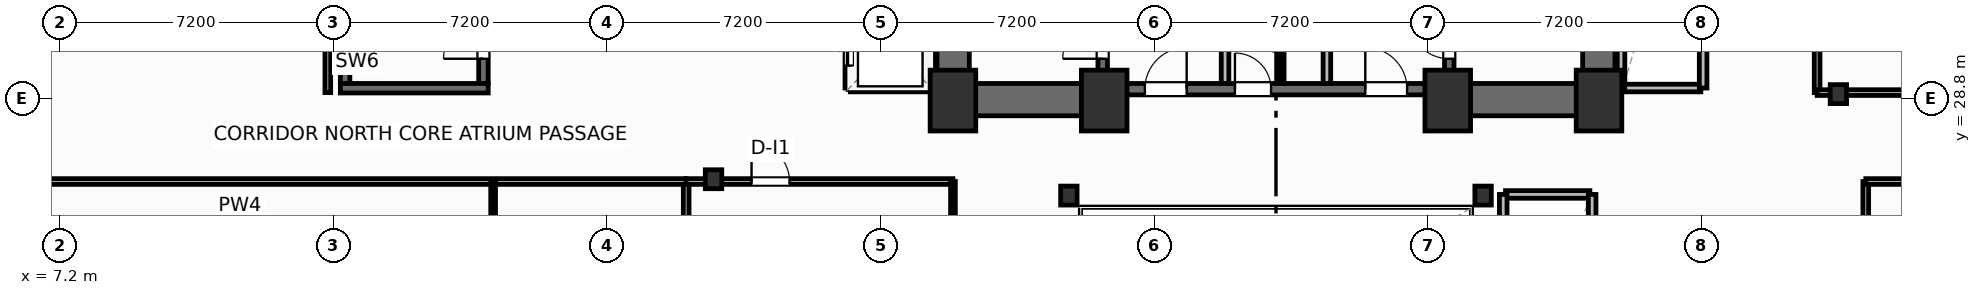
"""IFC4 building model, lengths in metres.
Left out: names, types, materials, properties, quantities, classifications, styles, units other than length and angle.
Written with IfcOpenShell. Run it as: python <this file> out.ifc"""

import sys

from ifc_helpers import new_model, si_unit, direction, frame, frame_2d, origin, origin_2d, place, context, subcontext, project, spatial, rectangle, i_section, extrude, element, fill, save


model = new_model("IFC4")
c1 = context("Model", 3, precision=1e-05, world=origin(), true_north=direction((0.0, 1.0)))
c2 = subcontext(c1, "Body", "Model", "MODEL_VIEW")
j1 = project(units=[si_unit("LENGTHUNIT", "METRE"), si_unit("PLANEANGLEUNIT", "RADIAN")], contexts=[c1])
p1 = place(None, origin())
s1 = spatial("IfcSite", under=j1, at=p1, CompositionType="ELEMENT")
p2 = place(p1, origin())
s2 = spatial("IfcBuilding", under=s1, at=p2, CompositionType="ELEMENT")
p3 = place(p2, frame((0.0, 0.0, 10.8)))
s3 = spatial("IfcBuildingStorey", under=s2, at=p3, CompositionType="ELEMENT", Elevation=10.8)
for number, where, z_axis, x_axis in (
    (1, (30.7, 28.75, 0.0), (0.0, 0.0, 1.0), (1.0, 0.0, 0.0)),
    (2, (34.68, 28.75, 0.0), (0.0, 0.0, 1.0), (1.0, 0.0, 0.0)),
    (3, (43.72, 28.75, 0.0), (0.0, 0.0, 1.0), (1.0, 0.0, 0.0)),
    (4, (47.7, 28.75, 0.0), (0.0, 0.0, 1.0), (1.0, 0.0, 0.0)),
):
    element("IfcColumn", number, at=place(p3, frame(where, z_axis=z_axis, x_axis=x_axis)), inside=s3, PredefinedType="COLUMN", context=c2, shape_type="SweptSolid", body=[
        extrude(rectangle(XDim=1.2, YDim=1.6, at=origin_2d()), origin(), (0.0, 0.0, 1.0), 5.4),
    ])
for number, where, z_axis, x_axis in (
    (5, (33.75, 26.25, 0.0), (0.0, 0.0, 1.0), (1.0, 0.0, 0.0)),
    (6, (44.65, 26.25, 0.0), (0.0, 0.0, 1.0), (1.0, 0.0, 0.0)),
    (7, (24.4, 26.68, 0.0), (0.0, 0.0, 1.0), (1.0, 0.0, 0.0)),
    (8, (54.0, 28.92, 0.0), (0.0, 0.0, 1.0), (1.0, 0.0, 0.0)),
):
    element("IfcColumn", number, at=place(p3, frame(where, z_axis=z_axis, x_axis=x_axis)), inside=s3, PredefinedType="COLUMN", context=c2, shape_type="SweptSolid", body=[
        extrude(i_section(OverallWidth=0.432, OverallDepth=0.498, WebThickness=0.056, FlangeThickness=0.089, FilletRadius=0.025, at=origin_2d()), origin(), (0.0, 0.0, 1.0), 5.4),
    ])
for number, where, z_axis, x_axis in (
    (9, (30.705, 29.2, 0.0), (0.0, 0.0, 1.0), (0.0, 1.0, 0.0)),
    (10, (47.695, 29.2, 0.0), (0.0, 0.0, 1.0), (0.0, 1.0, 0.0)),
):
    element("IfcWall", number, at=place(p3, frame(where, z_axis=z_axis, x_axis=x_axis)), inside=s3, PredefinedType="SHEAR", context=c2, shape_type="SweptSolid", body=[
        extrude(rectangle(XDim=9.22, YDim=0.85, at=frame_2d((4.61, 0.0))), origin(), (0.0, 0.0, 1.0), 5.12),
    ])
for number, where, z_axis, x_axis in (
    (11, (30.28, 28.775, 0.0), (0.0, 0.0, 1.0), (1.0, 0.0, 0.0)),
    (12, (43.6, 28.775, 0.0), (0.0, 0.0, 1.0), (1.0, 0.0, 0.0)),
):
    element("IfcWall", number, at=place(p3, frame(where, z_axis=z_axis, x_axis=x_axis)), inside=s3, PredefinedType="SHEAR", context=c2, shape_type="SweptSolid", body=[
        extrude(rectangle(XDim=4.52, YDim=0.85, at=frame_2d((2.26, 0.0))), origin(), (0.0, 0.0, 1.0), 5.12),
    ])
p4 = place(p3, frame((34.8, 29.05, 0.0), z_axis=(0.0, 0.0, 1.0), x_axis=(1.0, 0.0, 0.0)))
e13 = element("IfcWall", 13, at=p4, inside=s3, PredefinedType="SHEAR", context=c2, shape_type="SweptSolid", body=[
    extrude(rectangle(XDim=8.8, YDim=0.3, at=frame_2d((4.4, 0.0))), origin(), (0.0, 0.0, 1.0), 5.12),
])
p5 = place(p4, frame((0.95, 0.0, 0.0)))
e14 = element("IfcOpeningElement", 14, at=p5, cuts=e13, PredefinedType="OPENING", context=c2, shape_type="SweptSolid", body=[
    extrude(rectangle(XDim=1.1, YDim=2.15, at=frame_2d((0.55, 1.075))), frame((0.0, 0.16, 0.0), z_axis=(0.0, -1.0, 0.0), x_axis=(1.0, 0.0, 0.0)), (0.0, 0.0, 1.0), 0.32),
])
p6 = place(p4, frame((6.75, 0.0, 0.0)))
e15 = element("IfcOpeningElement", 15, at=p6, cuts=e13, PredefinedType="OPENING", context=c2, shape_type="SweptSolid", body=[
    extrude(rectangle(XDim=1.1, YDim=2.15, at=frame_2d((0.55, 1.075))), frame((0.0, 0.16, 0.0), z_axis=(0.0, -1.0, 0.0), x_axis=(1.0, 0.0, 0.0)), (0.0, 0.0, 1.0), 0.32),
])
p7 = place(p4, frame((3.32, 0.0, 0.0)))
e16 = element("IfcOpeningElement", 16, at=p7, cuts=e13, PredefinedType="OPENING", context=c2, shape_type="SweptSolid", body=[
    extrude(rectangle(XDim=0.95, YDim=2.15, at=frame_2d((0.475, 1.075))), frame((0.0, 0.16, 0.0), z_axis=(0.0, -1.0, 0.0), x_axis=(1.0, 0.0, 0.0)), (0.0, 0.0, 1.0), 0.32),
])
p8 = place(p3, frame((34.64, 29.2, 0.0), z_axis=(0.0, 0.0, 1.0), x_axis=(0.0, 1.0, 0.0)))
e17 = element("IfcWall", 17, at=p8, inside=s3, PredefinedType="SHEAR", context=c2, shape_type="SweptSolid", body=[
    extrude(rectangle(XDim=9.22, YDim=0.25, at=frame_2d((4.61, 0.0))), origin(), (0.0, 0.0, 1.0), 5.12),
])
p9 = place(p8, frame((0.65, 0.0, 0.0)))
e18 = element("IfcOpeningElement", 18, at=p9, cuts=e17, PredefinedType="OPENING", context=c2, shape_type="SweptSolid", body=[
    extrude(rectangle(XDim=1.05, YDim=2.15, at=frame_2d((0.525, 1.075))), frame((0.0, 0.135, 0.0), z_axis=(0.0, -1.0, 0.0), x_axis=(1.0, 0.0, 0.0)), (0.0, 0.0, 1.0), 0.27),
])
p10 = place(p3, frame((43.76, 29.2, 0.0), z_axis=(0.0, 0.0, 1.0), x_axis=(0.0, 1.0, 0.0)))
e19 = element("IfcWall", 19, at=p10, inside=s3, PredefinedType="SHEAR", context=c2, shape_type="SweptSolid", body=[
    extrude(rectangle(XDim=9.22, YDim=0.25, at=frame_2d((4.61, 0.0))), origin(), (0.0, 0.0, 1.0), 5.12),
])
p11 = place(p10, frame((0.65, 0.0, 0.0)))
e20 = element("IfcOpeningElement", 20, at=p11, cuts=e19, PredefinedType="OPENING", context=c2, shape_type="SweptSolid", body=[
    extrude(rectangle(XDim=1.05, YDim=2.15, at=frame_2d((0.525, 1.075))), frame((0.0, 0.135, 0.0), z_axis=(0.0, -1.0, 0.0), x_axis=(1.0, 0.0, 0.0)), (0.0, 0.0, 1.0), 0.27),
])
p12 = place(p3, frame((14.705, 29.2, 0.0), z_axis=(0.0, 0.0, 1.0), x_axis=(0.0, 1.0, 0.0)))
e21 = element("IfcWall", 21, at=p12, inside=s3, PredefinedType="SHEAR", context=c2, shape_type="SweptSolid", body=[
    extrude(rectangle(XDim=9.22, YDim=0.25, at=frame_2d((4.61, 0.0))), origin(), (0.0, 0.0, 1.0), 5.12),
])
p13 = place(p3, frame((18.345, 29.2, 0.0), z_axis=(0.0, 0.0, 1.0), x_axis=(0.0, 1.0, 0.0)))
e22 = element("IfcWall", 22, at=p13, inside=s3, PredefinedType="SHEAR", context=c2, shape_type="SweptSolid", body=[
    extrude(rectangle(XDim=9.22, YDim=0.25, at=frame_2d((4.61, 0.0))), origin(), (0.0, 0.0, 1.0), 5.12),
])
p14 = place(p13, frame((0.65, 0.0, 0.0)))
e23 = element("IfcOpeningElement", 23, at=p14, cuts=e22, PredefinedType="OPENING", context=c2, shape_type="SweptSolid", body=[
    extrude(rectangle(XDim=1.05, YDim=2.15, at=frame_2d((0.525, 1.075))), frame((0.0, 0.135, 0.0), z_axis=(0.0, -1.0, 0.0), x_axis=(1.0, 0.0, 0.0)), (0.0, 0.0, 1.0), 0.27),
])
p15 = place(p3, frame((14.58, 29.075, 0.0), z_axis=(0.0, 0.0, 1.0), x_axis=(1.0, 0.0, 0.0)))
e24 = element("IfcWall", 24, at=p15, inside=s3, PredefinedType="SHEAR", context=c2, shape_type="SweptSolid", body=[
    extrude(rectangle(XDim=3.89, YDim=0.25, at=frame_2d((1.945, 0.0))), origin(), (0.0, 0.0, 1.0), 5.12),
])
p16 = place(p3, frame((23.68, 0.25, 0.0), z_axis=(0.0, 0.0, 1.0), x_axis=(0.0, 1.0, 0.0)))
e25 = element("IfcWall", 25, at=p16, inside=s3, PredefinedType="PARTITIONING", context=c2, shape_type="SweptSolid", body=[
    extrude(rectangle(XDim=26.37, YDim=0.15, at=frame_2d((13.185, 0.0))), origin(), (0.0, 0.0, 1.0), 5.12),
])
p17 = place(p16, frame((14.514, 0.0, 0.0)))
e26 = element("IfcOpeningElement", 26, at=p17, cuts=e25, PredefinedType="OPENING", context=c2, shape_type="SweptSolid", body=[
    extrude(rectangle(XDim=2.0, YDim=2.05, at=frame_2d((1.0, 1.025))), frame((0.0, 0.085, 0.0), z_axis=(0.0, -1.0, 0.0), x_axis=(1.0, 0.0, 0.0)), (0.0, 0.0, 1.0), 0.17),
])
p18 = place(p3, frame((54.72, 0.25, 0.0), z_axis=(0.0, 0.0, 1.0), x_axis=(0.0, 1.0, 0.0)))
e27 = element("IfcWall", 27, at=p18, inside=s3, PredefinedType="PARTITIONING", context=c2, shape_type="SweptSolid", body=[
    extrude(rectangle(XDim=26.37, YDim=0.15, at=frame_2d((13.185, 0.0))), origin(), (0.0, 0.0, 1.0), 5.12),
])
p19 = place(p18, frame((14.514, 0.0, 0.0)))
e28 = element("IfcOpeningElement", 28, at=p19, cuts=e27, PredefinedType="OPENING", context=c2, shape_type="SweptSolid", body=[
    extrude(rectangle(XDim=2.0, YDim=2.05, at=frame_2d((1.0, 1.025))), frame((0.0, 0.085, 0.0), z_axis=(0.0, -1.0, 0.0), x_axis=(1.0, 0.0, 0.0)), (0.0, 0.0, 1.0), 0.17),
])
for number, where, z_axis, x_axis in (
    (29, (0.2, 26.62, 0.0), (0.0, 0.0, 1.0), (1.0, 0.0, 0.0)),
    (30, (54.72, 26.62, 0.0), (0.0, 0.0, 1.0), (1.0, 0.0, 0.0)),
):
    element("IfcWall", number, at=place(p3, frame(where, z_axis=z_axis, x_axis=x_axis)), inside=s3, PredefinedType="PARTITIONING", context=c2, shape_type="SweptSolid", body=[
        extrude(rectangle(XDim=23.48, YDim=0.15, at=frame_2d((11.74, 0.0))), origin(), (0.0, 0.0, 1.0), 5.12),
    ])
p20 = place(p3, frame((53.44, 28.96, 0.0), z_axis=(0.0, 0.0, 1.0), x_axis=(0.0, 1.0, 0.0)))
e31 = element("IfcWall", 31, at=p20, inside=s3, PredefinedType="PARTITIONING", context=c2, shape_type="SweptSolid", body=[
    extrude(rectangle(XDim=21.34, YDim=0.15, at=frame_2d((10.67, 0.0))), origin(), (0.0, 0.0, 1.0), 5.12),
])
p21 = place(p20, frame((5.0, 0.0, 0.0)))
e32 = element("IfcOpeningElement", 32, at=p21, cuts=e31, PredefinedType="OPENING", context=c2, shape_type="SweptSolid", body=[
    extrude(rectangle(XDim=1.6, YDim=2.05, at=frame_2d((0.8, 1.025))), frame((0.0, 0.085, 0.0), z_axis=(0.0, -1.0, 0.0), x_axis=(1.0, 0.0, 0.0)), (0.0, 0.0, 1.0), 0.17),
])
p22 = place(p3, frame((53.44, 28.96, 0.0), z_axis=(0.0, 0.0, 1.0), x_axis=(1.0, 0.0, 0.0)))
e33 = element("IfcWall", 33, at=p22, inside=s3, PredefinedType="PARTITIONING", context=c2, shape_type="SweptSolid", body=[
    extrude(rectangle(XDim=24.76, YDim=0.15, at=frame_2d((12.38, 0.0))), origin(), (0.0, 0.0, 1.0), 4.332),
])
p23 = place(p3, frame((14.25, 28.96, 0.0), z_axis=(0.0, 0.0, 1.0), x_axis=(0.0, 1.0, 0.0)))
e34 = element("IfcWall", 34, at=p23, inside=s3, PredefinedType="PARTITIONING", context=c2, shape_type="SweptSolid", body=[
    extrude(rectangle(XDim=21.34, YDim=0.15, at=frame_2d((10.67, 0.0))), origin(), (0.0, 0.0, 1.0), 5.12),
])
p24 = place(p23, frame((10.62, 0.0, 0.0)))
e35 = element("IfcOpeningElement", 35, at=p24, cuts=e34, PredefinedType="OPENING", context=c2, shape_type="SweptSolid", body=[
    extrude(rectangle(XDim=1.0, YDim=2.05, at=frame_2d((0.5, 1.025))), frame((0.0, 0.085, 0.0), z_axis=(0.0, -1.0, 0.0), x_axis=(1.0, 0.0, 0.0)), (0.0, 0.0, 1.0), 0.17),
])
p25 = place(p3, frame((23.68, 26.62, 0.0), z_axis=(0.0, 0.0, 1.0), x_axis=(1.0, 0.0, 0.0)))
e36 = element("IfcWall", 36, at=p25, inside=s3, PredefinedType="PARTITIONING", context=c2, shape_type="SweptSolid", body=[
    extrude(rectangle(XDim=7.02, YDim=0.15, at=frame_2d((3.51, 0.0))), origin(), (0.0, 0.0, 1.0), 4.332),
])
p26 = place(p25, frame((1.72, 0.0, 0.0)))
e37 = element("IfcOpeningElement", 37, at=p26, cuts=e36, PredefinedType="OPENING", context=c2, shape_type="SweptSolid", body=[
    extrude(rectangle(XDim=1.0, YDim=2.05, at=frame_2d((0.5, 1.025))), frame((0.0, 0.085, 0.0), z_axis=(0.0, -1.0, 0.0), x_axis=(1.0, 0.0, 0.0)), (0.0, 0.0, 1.0), 0.17),
])
p27 = place(p3, frame((30.7, 19.24, 0.0), z_axis=(0.0, 0.0, 1.0), x_axis=(0.0, 1.0, 0.0)))
e38 = element("IfcWall", 38, at=p27, inside=s3, PredefinedType="PARTITIONING", context=c2, shape_type="SweptSolid", body=[
    extrude(rectangle(XDim=7.38, YDim=0.125, at=frame_2d((3.69, 0.0))), origin(), (0.0, 0.0, 1.0), 5.12),
])
p28 = place(p3, frame((18.6, 19.24, 0.0), z_axis=(0.0, 0.0, 1.0), x_axis=(0.0, 1.0, 0.0)))
e39 = element("IfcWall", 39, at=p28, inside=s3, PredefinedType="PARTITIONING", context=c2, shape_type="SweptSolid", body=[
    extrude(rectangle(XDim=7.34, YDim=0.125, at=frame_2d((3.67, 0.0))), origin(), (0.0, 0.0, 1.0), 5.12),
])
for number, where, z_axis, x_axis in (
    (40, (37.86, 29.2, 0.0), (0.0, 0.0, 1.0), (0.0, 1.0, 0.0)),
    (41, (40.54, 29.2, 0.0), (0.0, 0.0, 1.0), (0.0, 1.0, 0.0)),
):
    element("IfcWall", number, at=place(p3, frame(where, z_axis=z_axis, x_axis=x_axis)), inside=s3, PredefinedType="PARTITIONING", context=c2, shape_type="SweptSolid", body=[
        extrude(rectangle(XDim=5.18, YDim=0.2, at=frame_2d((2.59, 0.0))), origin(), (0.0, 0.0, 1.0), 5.12),
    ])
p29 = place(p3, frame((39.35, 29.2, 0.0), z_axis=(0.0, 0.0, 1.0), x_axis=(0.0, 1.0, 0.0)))
e42 = element("IfcWall", 42, at=p29, inside=s3, PredefinedType="PARTITIONING", context=c2, shape_type="SweptSolid", body=[
    extrude(rectangle(XDim=5.22, YDim=0.125, at=frame_2d((2.61, 0.0))), origin(), (0.0, 0.0, 1.0), 5.12),
])
p30 = place(p29, frame((0.8, 0.0, 0.0)))
e43 = element("IfcOpeningElement", 43, at=p30, cuts=e42, PredefinedType="OPENING", context=c2, shape_type="SweptSolid", body=[
    extrude(rectangle(XDim=0.85, YDim=2.05, at=frame_2d((0.425, 1.025))), frame((0.0, 0.073, 0.0), z_axis=(0.0, -1.0, 0.0), x_axis=(1.0, 0.0, 0.0)), (0.0, 0.0, 1.0), 0.145),
])
p31 = place(p29, frame((3.4, 0.0, 0.0)))
e44 = element("IfcOpeningElement", 44, at=p31, cuts=e42, PredefinedType="OPENING", context=c2, shape_type="SweptSolid", body=[
    extrude(rectangle(XDim=0.85, YDim=2.05, at=frame_2d((0.425, 1.025))), frame((0.0, 0.073, 0.0), z_axis=(0.0, -1.0, 0.0), x_axis=(1.0, 0.0, 0.0)), (0.0, 0.0, 1.0), 0.145),
])
p32 = place(p3, frame((28.0, 29.08, 0.0), z_axis=(0.0, 0.0, 1.0), x_axis=(1.0, 0.0, 0.0)))
e45 = element("IfcWall", 45, at=p32, inside=s3, PredefinedType="PARTITIONING", context=c2, shape_type="SweptSolid", body=[
    extrude(rectangle(XDim=2.1, YDim=0.2, at=frame_2d((1.05, 0.0))), origin(), (0.0, 0.0, 1.0), 5.12),
])
p33 = place(p3, frame((30.12, 29.08, 0.0), z_axis=(0.0, 0.0, 1.0), x_axis=(0.0, 1.0, 0.0)))
e46 = element("IfcWall", 46, at=p33, inside=s3, PredefinedType="PARTITIONING", context=c2, shape_type="SweptSolid", body=[
    extrude(rectangle(XDim=6.89, YDim=0.2, at=frame_2d((3.445, 0.0))), origin(), (0.0, 0.0, 1.0), 5.12),
])
p34 = place(p3, frame((27.96, 29.08, 0.0), z_axis=(0.0, 0.0, 1.0), x_axis=(0.0, 1.0, 0.0)))
e47 = element("IfcWall", 47, at=p34, inside=s3, PredefinedType="PARTITIONING", context=c2, shape_type="SweptSolid", body=[
    extrude(rectangle(XDim=6.89, YDim=0.2, at=frame_2d((3.445, 0.0))), origin(), (0.0, 0.0, 1.0), 5.12),
])
p35 = place(p34, frame((0.59, 0.0, 0.0)))
e48 = element("IfcOpeningElement", 48, at=p35, cuts=e47, PredefinedType="OPENING", context=c2, shape_type="SweptSolid", body=[
    extrude(rectangle(XDim=1.1, YDim=2.15, at=frame_2d((0.55, 1.075))), frame((0.0, 0.11, 0.0), z_axis=(0.0, -1.0, 0.0), x_axis=(1.0, 0.0, 0.0)), (0.0, 0.0, 1.0), 0.22),
])
p36 = place(p34, frame((2.89, 0.0, 0.0)))
e49 = element("IfcOpeningElement", 49, at=p36, cuts=e47, PredefinedType="OPENING", context=c2, shape_type="SweptSolid", body=[
    extrude(rectangle(XDim=1.1, YDim=2.15, at=frame_2d((0.55, 1.075))), frame((0.0, 0.11, 0.0), z_axis=(0.0, -1.0, 0.0), x_axis=(1.0, 0.0, 0.0)), (0.0, 0.0, 1.0), 0.22),
])
p37 = place(p34, frame((5.19, 0.0, 0.0)))
e50 = element("IfcOpeningElement", 50, at=p37, cuts=e47, PredefinedType="OPENING", context=c2, shape_type="SweptSolid", body=[
    extrude(rectangle(XDim=1.1, YDim=2.15, at=frame_2d((0.55, 1.075))), frame((0.0, 0.11, 0.0), z_axis=(0.0, -1.0, 0.0), x_axis=(1.0, 0.0, 0.0)), (0.0, 0.0, 1.0), 0.22),
])
p38 = place(p3, frame((48.32, 29.08, 0.0), z_axis=(0.0, 0.0, 1.0), x_axis=(1.0, 0.0, 0.0)))
e51 = element("IfcWall", 51, at=p38, inside=s3, PredefinedType="PARTITIONING", context=c2, shape_type="SweptSolid", body=[
    extrude(rectangle(XDim=2.06, YDim=0.2, at=frame_2d((1.03, 0.0))), origin(), (0.0, 0.0, 1.0), 4.332),
])
for number, where, z_axis, x_axis in (
    (52, (48.28, 29.08, 0.0), (0.0, 0.0, 1.0), (0.0, 1.0, 0.0)),
    (53, (50.44, 29.08, 0.0), (0.0, 0.0, 1.0), (0.0, 1.0, 0.0)),
):
    element("IfcWall", number, at=place(p3, frame(where, z_axis=z_axis, x_axis=x_axis)), inside=s3, PredefinedType="PARTITIONING", context=c2, shape_type="SweptSolid", body=[
        extrude(rectangle(XDim=6.89, YDim=0.2, at=frame_2d((3.445, 0.0))), origin(), (0.0, 0.0, 1.0), 5.12),
    ])
p39 = place(p3, frame((45.24, 26.28, 0.0), z_axis=(0.0, 0.0, 1.0), x_axis=(1.0, 0.0, 0.0)))
e54 = element("IfcWall", 54, at=p39, inside=s3, PredefinedType="PARTITIONING", context=c2, shape_type="SweptSolid", body=[
    extrude(rectangle(XDim=2.22, YDim=0.2, at=frame_2d((1.11, 0.0))), origin(), (0.0, 0.0, 1.0), 5.12),
])
for number, where, z_axis, x_axis in (
    (55, (45.18, 19.38, 0.0), (0.0, 0.0, 1.0), (0.0, 1.0, 0.0)),
    (56, (47.52, 19.38, 0.0), (0.0, 0.0, 1.0), (0.0, 1.0, 0.0)),
):
    element("IfcWall", number, at=place(p3, frame(where, z_axis=z_axis, x_axis=x_axis)), inside=s3, PredefinedType="PARTITIONING", context=c2, shape_type="SweptSolid", body=[
        extrude(rectangle(XDim=6.9, YDim=0.2, at=frame_2d((3.45, 0.0))), origin(), (0.0, 0.0, 1.0), 5.12),
    ])
p40 = place(p26, origin())
e57 = element("IfcDoor", 57, at=p40, inside=s3, OperationType="SINGLE_SWING_LEFT", PredefinedType="DOOR", context=c2, shape_type="SweptSolid", body=[
    extrude(rectangle(XDim=1.0, YDim=2.05, at=frame_2d((0.5, 1.025))), frame((0.0, 0.025, 0.0), z_axis=(0.0, -1.0, 0.0), x_axis=(1.0, 0.0, 0.0)), (0.0, 0.0, 1.0), 0.05),
])
fill(e37, e57)
p41 = place(p9, origin())
e58 = element("IfcDoor", 58, at=p41, inside=s3, OperationType="SINGLE_SWING_LEFT", PredefinedType="DOOR", context=c2, shape_type="SweptSolid", body=[
    extrude(rectangle(XDim=1.05, YDim=2.15, at=frame_2d((0.525, 1.075))), frame((0.0, 0.025, 0.0), z_axis=(0.0, -1.0, 0.0), x_axis=(1.0, 0.0, 0.0)), (0.0, 0.0, 1.0), 0.05),
])
fill(e18, e58)
p42 = place(p11, origin())
e59 = element("IfcDoor", 59, at=p42, inside=s3, OperationType="SINGLE_SWING_RIGHT", PredefinedType="DOOR", context=c2, shape_type="SweptSolid", body=[
    extrude(rectangle(XDim=1.05, YDim=2.15, at=frame_2d((0.525, 1.075))), frame((0.0, 0.025, 0.0), z_axis=(0.0, -1.0, 0.0), x_axis=(1.0, 0.0, 0.0)), (0.0, 0.0, 1.0), 0.05),
])
fill(e20, e59)
p43 = place(p14, origin())
e60 = element("IfcDoor", 60, at=p43, inside=s3, OperationType="SINGLE_SWING_LEFT", PredefinedType="DOOR", context=c2, shape_type="SweptSolid", body=[
    extrude(rectangle(XDim=1.05, YDim=2.15, at=frame_2d((0.525, 1.075))), frame((0.0, 0.025, 0.0), z_axis=(0.0, -1.0, 0.0), x_axis=(1.0, 0.0, 0.0)), (0.0, 0.0, 1.0), 0.05),
])
fill(e23, e60)
p44 = place(p5, origin())
e61 = element("IfcDoor", 61, at=p44, inside=s3, OperationType="SINGLE_SWING_RIGHT", PredefinedType="DOOR", context=c2, shape_type="SweptSolid", body=[
    extrude(rectangle(XDim=1.1, YDim=2.15, at=frame_2d((0.55, 1.075))), frame((0.0, 0.025, 0.0), z_axis=(0.0, -1.0, 0.0), x_axis=(1.0, 0.0, 0.0)), (0.0, 0.0, 1.0), 0.05),
])
fill(e14, e61)
p45 = place(p6, origin())
e62 = element("IfcDoor", 62, at=p45, inside=s3, OperationType="SINGLE_SWING_LEFT", PredefinedType="DOOR", context=c2, shape_type="SweptSolid", body=[
    extrude(rectangle(XDim=1.1, YDim=2.15, at=frame_2d((0.55, 1.075))), frame((0.0, 0.025, 0.0), z_axis=(0.0, -1.0, 0.0), x_axis=(1.0, 0.0, 0.0)), (0.0, 0.0, 1.0), 0.05),
])
fill(e15, e62)
p46 = place(p30, origin())
e63 = element("IfcDoor", 63, at=p46, inside=s3, OperationType="SINGLE_SWING_RIGHT", PredefinedType="DOOR", context=c2, shape_type="SweptSolid", body=[
    extrude(rectangle(XDim=0.85, YDim=2.05, at=frame_2d((0.425, 1.025))), frame((0.0, 0.025, 0.0), z_axis=(0.0, -1.0, 0.0), x_axis=(1.0, 0.0, 0.0)), (0.0, 0.0, 1.0), 0.05),
])
fill(e43, e63)
p47 = place(p7, origin())
e64 = element("IfcDoor", 64, at=p47, inside=s3, OperationType="SINGLE_SWING_LEFT", PredefinedType="DOOR", context=c2, shape_type="SweptSolid", body=[
    extrude(rectangle(XDim=0.95, YDim=2.15, at=frame_2d((0.475, 1.075))), frame((0.0, 0.025, 0.0), z_axis=(0.0, -1.0, 0.0), x_axis=(1.0, 0.0, 0.0)), (0.0, 0.0, 1.0), 0.05),
])
fill(e16, e64)
p48 = place(p35, origin())
e65 = element("IfcDoor", 65, at=p48, inside=s3, OperationType="SLIDING_TO_LEFT", PredefinedType="DOOR", context=c2, shape_type="SweptSolid", body=[
    extrude(rectangle(XDim=1.1, YDim=2.15, at=frame_2d((0.55, 1.075))), frame((0.0, 0.025, 0.0), z_axis=(0.0, -1.0, 0.0), x_axis=(1.0, 0.0, 0.0)), (0.0, 0.0, 1.0), 0.05),
])
fill(e48, e65)
save(model, sys.argv[1])
